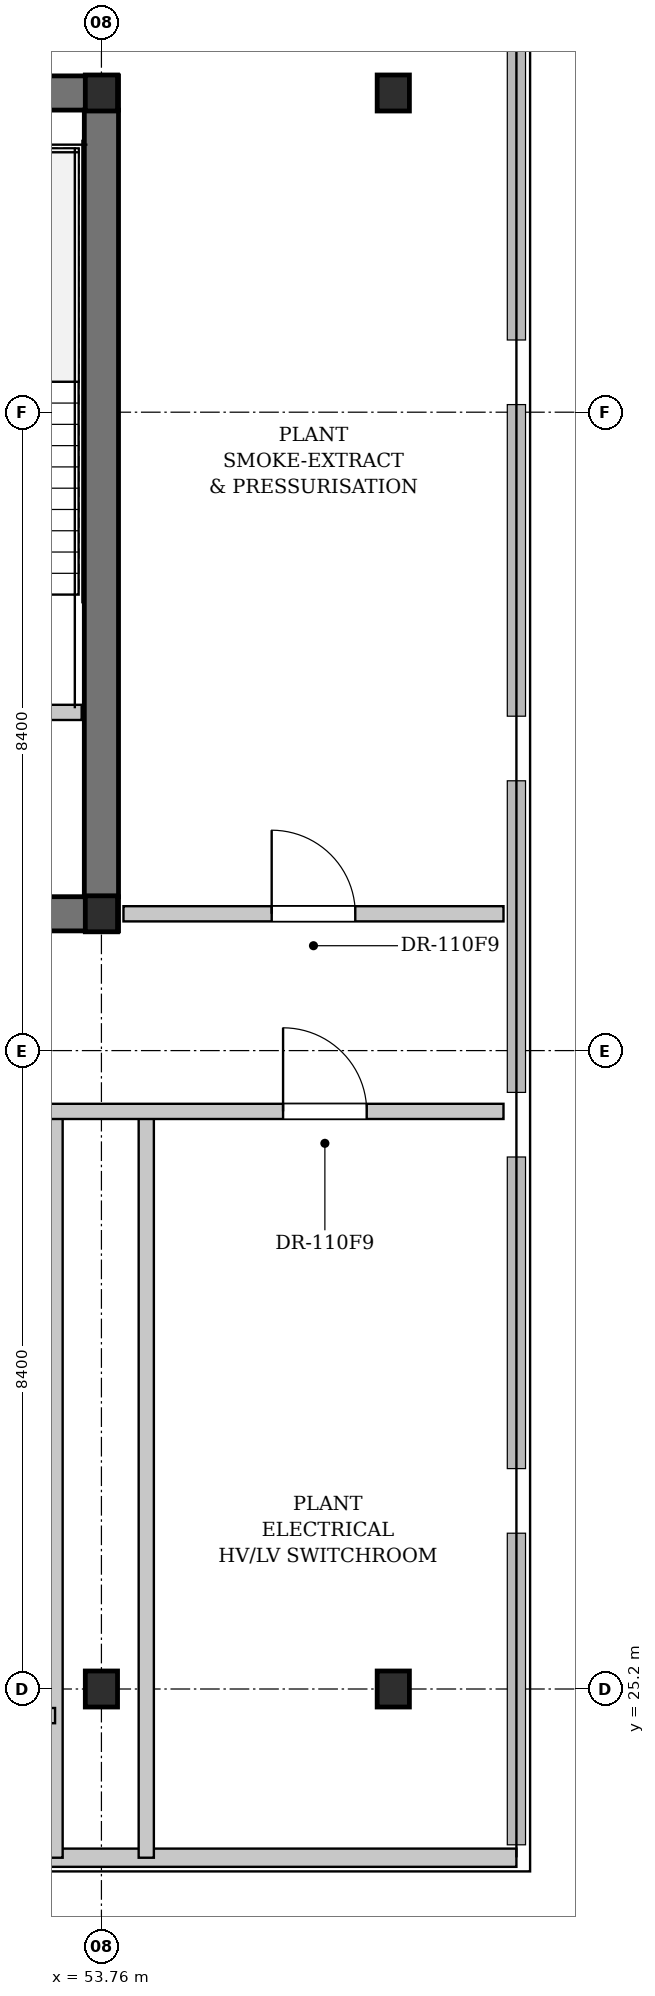
"""IFC4 building model, lengths in metres.
Left out: names, types, materials, properties, quantities, classifications, styles, units other than length and angle.
Written with IfcOpenShell. Run it as: python <this file> out.ifc"""

import sys

from ifc_helpers import new_model, si_unit, direction, frame, frame_2d, origin, origin_2d, place, context, subcontext, project, spatial, rectangle, i_section, extrude, element, fill, save


model = new_model("IFC4")
c1 = context("Model", 3, precision=1e-05, world=origin(), true_north=direction((0.0, 1.0)))
c2 = subcontext(c1, "Body", "Model", "MODEL_VIEW")
j1 = project(units=[si_unit("LENGTHUNIT", "METRE"), si_unit("PLANEANGLEUNIT", "RADIAN")], contexts=[c1])
p1 = place(None, origin())
s1 = spatial("IfcSite", under=j1, at=p1, CompositionType="ELEMENT")
p2 = place(p1, origin())
s2 = spatial("IfcBuilding", under=s1, at=p2, CompositionType="ELEMENT")
p3 = place(p2, frame((0.0, 0.0, 137.3)))
s3 = spatial("IfcBuildingStorey", under=s2, at=p3, CompositionType="ELEMENT", Elevation=137.3)
p4 = place(p3, frame((22.815, 46.2, 0.0), z_axis=(0.0, 0.0, 1.0), x_axis=(1.0, 0.0, 0.0)))
e1 = element("IfcWall", 1, at=p4, inside=s3, PredefinedType="SHEAR", context=c2, shape_type="SweptSolid", body=[
    extrude(rectangle(XDim=31.17, YDim=0.45, at=frame_2d((15.585, 0.0))), origin(), (0.0, 0.0, 1.0), 3.68),
])
p5 = place(p3, frame((52.45, 35.4, 0.0), z_axis=(0.0, 0.0, 1.0), x_axis=(1.0, 0.0, 0.0)))
e2 = element("IfcWall", 2, at=p5, inside=s3, PredefinedType="SHEAR", context=c2, shape_type="SweptSolid", body=[
    extrude(rectangle(XDim=1.535, YDim=0.45, at=frame_2d((0.768, 0.0))), origin(), (0.0, 0.0, 1.0), 3.68),
])
p6 = place(p3, frame((53.76, 35.625, 0.0), z_axis=(0.0, 0.0, 1.0), x_axis=(0.0, 1.0, 0.0)))
e3 = element("IfcWall", 3, at=p6, inside=s3, PredefinedType="SHEAR", context=c2, shape_type="SweptSolid", body=[
    extrude(rectangle(XDim=10.35, YDim=0.45, at=frame_2d((5.175, 0.0))), origin(), (0.0, 0.0, 1.0), 3.68),
])
for number, where, z_axis, x_axis in (
    (4, (53.76, 35.4, 0.0), (0.0, 0.0, 1.0), (1.0, 0.0, 0.0)),
    (5, (53.76, 46.2, 0.0), (0.0, 0.0, 1.0), (1.0, 0.0, 0.0)),
    (6, (53.76, 25.2, 0.0), (0.0, 0.0, 1.0), (1.0, 0.0, 0.0)),
    (7, (57.6, 25.2, 0.0), (0.0, 0.0, 1.0), (1.0, 0.0, 0.0)),
    (8, (57.6, 46.2, 0.0), (0.0, 0.0, 1.0), (1.0, 0.0, 0.0)),
):
    element("IfcColumn", number, at=place(p3, frame(where, z_axis=z_axis, x_axis=x_axis)), inside=s3, PredefinedType="COLUMN", context=c2, shape_type="SweptSolid", body=[
        extrude(i_section(OverallWidth=0.424, OverallDepth=0.474, WebThickness=0.047, FlangeThickness=0.077, FilletRadius=0.015, at=origin_2d()), origin(), (0.0, 0.0, 1.0), 3.9),
    ])
p7 = place(p3, frame((17.58, 22.98, 0.0), z_axis=(0.0, 0.0, 1.0), x_axis=(1.0, 0.0, 0.0)))
e9 = element("IfcWall", 9, at=p7, inside=s3, PredefinedType="SOLIDWALL", context=c2, shape_type="SweptSolid", body=[
    extrude(rectangle(XDim=41.64, YDim=0.24, at=frame_2d((20.82, 0.0))), origin(), (0.0, 0.0, 1.0), 3.68),
])
p8 = place(p7, frame((16.18, 0.0, 0.0)))
e10 = element("IfcOpeningElement", 10, at=p8, cuts=e9, PredefinedType="OPENING", context=c2, shape_type="SweptSolid", body=[
    extrude(rectangle(XDim=1.6, YDim=2.25, at=frame_2d((0.8, 1.125))), frame((0.0, 0.13, 0.0), z_axis=(0.0, -1.0, 0.0), x_axis=(1.0, 0.0, 0.0)), (0.0, 0.0, 1.0), 0.26),
])
p9 = place(p7, frame((8.4, 0.0, 0.9)))
e11 = element("IfcOpeningElement", 11, at=p9, cuts=e9, PredefinedType="OPENING", context=c2, shape_type="SweptSolid", body=[
    extrude(rectangle(XDim=1.8, YDim=2.0, at=frame_2d((0.9, 1.0))), frame((0.0, 0.13, 0.0), z_axis=(0.0, -1.0, 0.0), x_axis=(1.0, 0.0, 0.0)), (0.0, 0.0, 1.0), 0.26),
])
p10 = place(p7, frame((31.44, 0.0, 0.9)))
e12 = element("IfcOpeningElement", 12, at=p10, cuts=e9, PredefinedType="OPENING", context=c2, shape_type="SweptSolid", body=[
    extrude(rectangle(XDim=1.8, YDim=2.0, at=frame_2d((0.9, 1.0))), frame((0.0, 0.13, 0.0), z_axis=(0.0, -1.0, 0.0), x_axis=(1.0, 0.0, 0.0)), (0.0, 0.0, 1.0), 0.26),
])
p11 = place(p3, frame((49.78, 38.05, 0.0), z_axis=(0.0, 0.0, 1.0), x_axis=(1.0, 0.0, 0.0)))
e13 = element("IfcWall", 13, at=p11, inside=s3, PredefinedType="PARTITIONING", context=c2, shape_type="SweptSolid", body=[
    extrude(rectangle(XDim=3.72, YDim=0.2, at=frame_2d((1.86, 0.0))), origin(), (0.0, 0.0, 1.0), 3.68),
])
p12 = place(p11, frame((1.436, 0.0, 0.0)))
e14 = element("IfcOpeningElement", 14, at=p12, cuts=e13, PredefinedType="OPENING", context=c2, shape_type="SweptSolid", body=[
    extrude(rectangle(XDim=1.1, YDim=2.15, at=frame_2d((0.55, 1.075))), frame((0.0, 0.11, 0.0), z_axis=(0.0, -1.0, 0.0), x_axis=(1.0, 0.0, 0.0)), (0.0, 0.0, 1.0), 0.22),
])
p13 = place(p3, frame((54.05, 35.4, 0.0), z_axis=(0.0, 0.0, 1.0), x_axis=(1.0, 0.0, 0.0)))
e15 = element("IfcWall", 15, at=p13, inside=s3, PredefinedType="PARTITIONING", context=c2, shape_type="SweptSolid", body=[
    extrude(rectangle(XDim=5.0, YDim=0.2, at=frame_2d((2.5, 0.0))), origin(), (0.0, 0.0, 1.0), 3.68),
])
p14 = place(p13, frame((1.95, 0.0, 0.0)))
e16 = element("IfcOpeningElement", 16, at=p14, cuts=e15, PredefinedType="OPENING", context=c2, shape_type="SweptSolid", body=[
    extrude(rectangle(XDim=1.1, YDim=2.15, at=frame_2d((0.55, 1.075))), frame((0.0, 0.11, 0.0), z_axis=(0.0, -1.0, 0.0), x_axis=(1.0, 0.0, 0.0)), (0.0, 0.0, 1.0), 0.22),
])
for number, where, z_axis, x_axis in (
    (17, (53.15, 22.98, 0.0), (0.0, 0.0, 1.0), (0.0, 1.0, 0.0)),
    (18, (54.35, 22.98, 0.0), (0.0, 0.0, 1.0), (0.0, 1.0, 0.0)),
):
    element("IfcWall", number, at=place(p3, frame(where, z_axis=z_axis, x_axis=x_axis)), inside=s3, PredefinedType="PARTITIONING", context=c2, shape_type="SweptSolid", body=[
        extrude(rectangle(XDim=9.82, YDim=0.2, at=frame_2d((4.91, 0.0))), origin(), (0.0, 0.0, 1.0), 3.68),
    ])
p15 = place(p3, frame((23.65, 24.85, 0.0), z_axis=(0.0, 0.0, 1.0), x_axis=(1.0, 0.0, 0.0)))
e19 = element("IfcWall", 19, at=p15, inside=s3, PredefinedType="PARTITIONING", context=c2, shape_type="SweptSolid", body=[
    extrude(rectangle(XDim=29.5, YDim=0.2, at=frame_2d((14.75, 0.0))), origin(), (0.0, 0.0, 1.0), 3.68),
])
p16 = place(p15, frame((10.4, 0.0, 0.0)))
e20 = element("IfcOpeningElement", 20, at=p16, cuts=e19, PredefinedType="OPENING", context=c2, shape_type="SweptSolid", body=[
    extrude(rectangle(XDim=1.1, YDim=2.15, at=frame_2d((0.55, 1.075))), frame((0.0, 0.11, 0.0), z_axis=(0.0, -1.0, 0.0), x_axis=(1.0, 0.0, 0.0)), (0.0, 0.0, 1.0), 0.22),
])
p17 = place(p3, frame((17.75, 32.8, 0.0), z_axis=(0.0, 0.0, 1.0), x_axis=(1.0, 0.0, 0.0)))
e21 = element("IfcWall", 21, at=p17, inside=s3, PredefinedType="PARTITIONING", context=c2, shape_type="SweptSolid", body=[
    extrude(rectangle(XDim=41.3, YDim=0.2, at=frame_2d((20.65, 0.0))), origin(), (0.0, 0.0, 1.0), 3.68),
])
p18 = place(p17, frame((1.8, 0.0, 0.0)))
e22 = element("IfcOpeningElement", 22, at=p18, cuts=e21, PredefinedType="OPENING", context=c2, shape_type="SweptSolid", body=[
    extrude(rectangle(XDim=1.1, YDim=2.15, at=frame_2d((0.55, 1.075))), frame((0.0, 0.11, 0.0), z_axis=(0.0, -1.0, 0.0), x_axis=(1.0, 0.0, 0.0)), (0.0, 0.0, 1.0), 0.22),
])
p19 = place(p17, frame((8.58, 0.0, 0.0)))
e23 = element("IfcOpeningElement", 23, at=p19, cuts=e21, PredefinedType="OPENING", context=c2, shape_type="SweptSolid", body=[
    extrude(rectangle(XDim=1.1, YDim=2.15, at=frame_2d((0.55, 1.075))), frame((0.0, 0.11, 0.0), z_axis=(0.0, -1.0, 0.0), x_axis=(1.0, 0.0, 0.0)), (0.0, 0.0, 1.0), 0.22),
])
p20 = place(p17, frame((16.3, 0.0, 0.0)))
e24 = element("IfcOpeningElement", 24, at=p20, cuts=e21, PredefinedType="OPENING", context=c2, shape_type="SweptSolid", body=[
    extrude(rectangle(XDim=1.1, YDim=2.15, at=frame_2d((0.55, 1.075))), frame((0.0, 0.11, 0.0), z_axis=(0.0, -1.0, 0.0), x_axis=(1.0, 0.0, 0.0)), (0.0, 0.0, 1.0), 0.22),
])
p21 = place(p17, frame((23.94, 0.0, 0.0)))
e25 = element("IfcOpeningElement", 25, at=p21, cuts=e21, PredefinedType="OPENING", context=c2, shape_type="SweptSolid", body=[
    extrude(rectangle(XDim=1.1, YDim=2.15, at=frame_2d((0.55, 1.075))), frame((0.0, 0.11, 0.0), z_axis=(0.0, -1.0, 0.0), x_axis=(1.0, 0.0, 0.0)), (0.0, 0.0, 1.0), 0.22),
])
p22 = place(p17, frame((38.4, 0.0, 0.0)))
e26 = element("IfcOpeningElement", 26, at=p22, cuts=e21, PredefinedType="OPENING", context=c2, shape_type="SweptSolid", body=[
    extrude(rectangle(XDim=1.1, YDim=2.15, at=frame_2d((0.55, 1.075))), frame((0.0, 0.11, 0.0), z_axis=(0.0, -1.0, 0.0), x_axis=(1.0, 0.0, 0.0)), (0.0, 0.0, 1.0), 0.22),
])
p23 = place(p14, origin())
e27 = element("IfcDoor", 27, at=p23, inside=s3, OperationType="SINGLE_SWING_LEFT", PredefinedType="DOOR", context=c2, shape_type="SweptSolid", body=[
    extrude(rectangle(XDim=1.1, YDim=2.15, at=frame_2d((0.55, 1.075))), frame((0.0, 0.025, 0.0), z_axis=(0.0, -1.0, 0.0), x_axis=(1.0, 0.0, 0.0)), (0.0, 0.0, 1.0), 0.05),
])
fill(e16, e27)
p24 = place(p22, origin())
e28 = element("IfcDoor", 28, at=p24, inside=s3, OperationType="SINGLE_SWING_LEFT", PredefinedType="DOOR", context=c2, shape_type="SweptSolid", body=[
    extrude(rectangle(XDim=1.1, YDim=2.15, at=frame_2d((0.55, 1.075))), frame((0.0, 0.025, 0.0), z_axis=(0.0, -1.0, 0.0), x_axis=(1.0, 0.0, 0.0)), (0.0, 0.0, 1.0), 0.05),
])
fill(e26, e28)
save(model, sys.argv[1])
